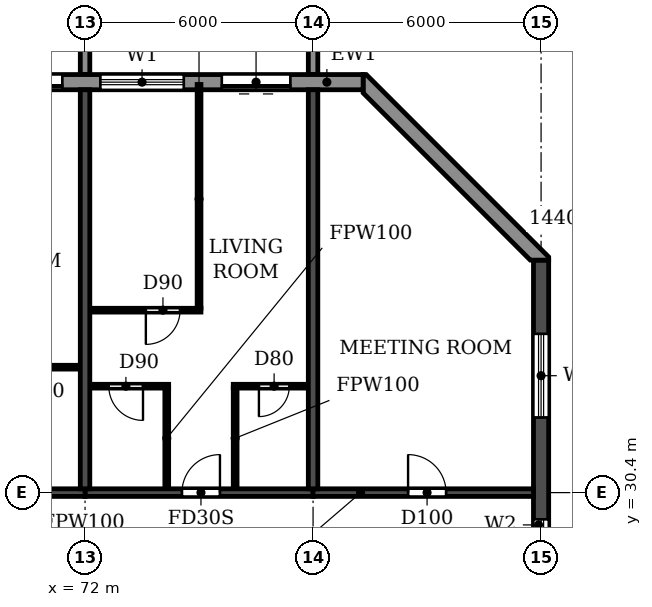
"""IFC4 building model, lengths in metres.
Left out: names, types, materials, properties, quantities, classifications, styles, units other than length and angle.
Written with IfcOpenShell. Run it as: python <this file> out.ifc"""

import sys

from ifc_helpers import new_model, si_unit, direction, frame, frame_2d, origin, place, context, subcontext, project, spatial, polyline, rectangle, outline, extrude, source, transform, mapped, element, fill, save


model = new_model("IFC4")
c1 = context("Model", 3, precision=1e-05, world=origin(), true_north=direction((0.0, 1.0)))
c2 = subcontext(c1, "Body", "Model", "MODEL_VIEW")
j1 = project(units=[si_unit("LENGTHUNIT", "METRE"), si_unit("PLANEANGLEUNIT", "RADIAN")], contexts=[c1])
p1 = place(None, origin())
s1 = spatial("IfcSite", under=j1, at=p1, CompositionType="ELEMENT")
p2 = place(p1, origin())
s2 = spatial("IfcBuilding", under=s1, at=p2, CompositionType="ELEMENT")
p3 = place(p2, frame((0.0, 0.0, 231.3)))
s3 = spatial("IfcBuildingStorey", under=s2, at=p3, CompositionType="ELEMENT", Elevation=231.3)
for number, where, z_axis, x_axis in (
    (1, (72.0, 30.5, 0.0), (0.0, 0.0, 1.0), (0.0, 1.0, 0.0)),
    (2, (78.0, 30.5, 0.0), (0.0, 0.0, 1.0), (0.0, 1.0, 0.0)),
):
    element("IfcWall", number, at=place(p3, frame(where, z_axis=z_axis, x_axis=x_axis)), inside=s3, PredefinedType="SHEAR", context=c2, shape_type="SweptSolid", body=[
        extrude(rectangle(XDim=10.5, YDim=0.25, at=frame_2d((5.25, 0.0))), origin(), (0.0, 0.0, 1.0), 3.08),
    ])
p4 = place(p3, frame((84.0, 4.683, 0.0), z_axis=(0.0, 0.0, 1.0), x_axis=(0.0, 1.0, 0.0)))
e3 = element("IfcWall", 3, at=p4, inside=s3, PredefinedType="SHEAR", context=c2, shape_type="SweptSolid", body=[
    extrude(rectangle(XDim=31.834, YDim=0.4, at=frame_2d((15.917, 0.0))), origin(), (0.0, 0.0, 1.0), 3.08),
])
p5 = place(p4, frame((23.817, 0.0, 0.9)))
e4 = element("IfcOpeningElement", 4, at=p5, cuts=e3, PredefinedType="OPENING", context=c2, shape_type="SweptSolid", body=[
    extrude(rectangle(XDim=1.2, YDim=1.5, at=frame_2d((0.6, 0.75))), frame((0.0, 0.21, 0.0), z_axis=(0.0, -1.0, 0.0), x_axis=(1.0, 0.0, 0.0)), (0.0, 0.0, 1.0), 0.42),
])
p6 = place(p4, frame((8.017, 0.0, 0.9)))
e5 = element("IfcOpeningElement", 5, at=p6, cuts=e3, PredefinedType="OPENING", context=c2, shape_type="SweptSolid", body=[
    extrude(rectangle(XDim=1.2, YDim=1.5, at=frame_2d((0.6, 0.75))), frame((0.0, 0.21, 0.0), z_axis=(0.0, -1.0, 0.0), x_axis=(1.0, 0.0, 0.0)), (0.0, 0.0, 1.0), 0.42),
])
p7 = place(p4, frame((27.694, 0.0, 0.6)))
e6 = element("IfcOpeningElement", 6, at=p7, cuts=e3, PredefinedType="OPENING", context=c2, shape_type="SweptSolid", body=[
    extrude(rectangle(XDim=2.2, YDim=1.8, at=frame_2d((1.1, 0.9))), frame((0.0, 0.21, 0.0), z_axis=(0.0, -1.0, 0.0), x_axis=(1.0, 0.0, 0.0)), (0.0, 0.0, 1.0), 0.42),
])
p8 = place(p4, frame((2.541, 0.0, 0.6)))
e7 = element("IfcOpeningElement", 7, at=p8, cuts=e3, PredefinedType="OPENING", context=c2, shape_type="SweptSolid", body=[
    extrude(rectangle(XDim=2.2, YDim=1.8, at=frame_2d((1.1, 0.9))), frame((0.0, 0.21, 0.0), z_axis=(0.0, -1.0, 0.0), x_axis=(1.0, 0.0, 0.0)), (0.0, 0.0, 1.0), 0.42),
])
p9 = place(p4, frame((15.917, 0.0, 0.9)))
e8 = element("IfcOpeningElement", 8, at=p9, cuts=e3, PredefinedType="OPENING", context=c2, shape_type="SweptSolid", body=[
    extrude(rectangle(XDim=1.2, YDim=1.5, at=frame_2d((0.6, 0.75))), frame((0.0, 0.21, 0.0), z_axis=(0.0, -1.0, 0.0), x_axis=(1.0, 0.0, 0.0)), (0.0, 0.0, 1.0), 0.42),
])
p10 = place(p3, frame((66.0, 30.4, 0.0), z_axis=(0.0, 0.0, 1.0), x_axis=(1.0, 0.0, 0.0)))
e9 = element("IfcWall", 9, at=p10, inside=s3, PredefinedType="SHEAR", context=c2, shape_type="SweptSolid", body=[
    extrude(rectangle(XDim=6.0, YDim=0.2, at=frame_2d((3.0, 0.0))), origin(), (0.0, 0.0, 1.0), 2.48),
])
p11 = place(p10, frame((2.55, 0.0, 0.0)))
e10 = element("IfcOpeningElement", 10, at=p11, cuts=e9, PredefinedType="OPENING", context=c2, shape_type="SweptSolid", body=[
    extrude(rectangle(XDim=1.0, YDim=2.1, at=frame_2d((0.5, 1.05))), frame((0.0, 0.11, 0.0), z_axis=(0.0, -1.0, 0.0), x_axis=(1.0, 0.0, 0.0)), (0.0, 0.0, 1.0), 0.22),
])
p12 = place(p3, frame((72.0, 30.4, 0.0), z_axis=(0.0, 0.0, 1.0), x_axis=(1.0, 0.0, 0.0)))
e11 = element("IfcWall", 11, at=p12, inside=s3, PredefinedType="SHEAR", context=c2, shape_type="SweptSolid", body=[
    extrude(rectangle(XDim=6.0, YDim=0.2, at=frame_2d((3.0, 0.0))), origin(), (0.0, 0.0, 1.0), 2.48),
])
p13 = place(p12, frame((2.55, 0.0, 0.0)))
e12 = element("IfcOpeningElement", 12, at=p13, cuts=e11, PredefinedType="OPENING", context=c2, shape_type="SweptSolid", body=[
    extrude(rectangle(XDim=1.0, YDim=2.1, at=frame_2d((0.5, 1.05))), frame((0.0, 0.11, 0.0), z_axis=(0.0, -1.0, 0.0), x_axis=(1.0, 0.0, 0.0)), (0.0, 0.0, 1.0), 0.22),
])
p14 = place(p3, frame((78.0, 30.4, 0.0), z_axis=(0.0, 0.0, 1.0), x_axis=(1.0, 0.0, 0.0)))
e13 = element("IfcWall", 13, at=p14, inside=s3, PredefinedType="SHEAR", context=c2, shape_type="SweptSolid", body=[
    extrude(rectangle(XDim=5.8, YDim=0.2, at=frame_2d((2.9, 0.0))), origin(), (0.0, 0.0, 1.0), 2.48),
])
p15 = place(p14, frame((2.5, 0.0, 0.0)))
e14 = element("IfcOpeningElement", 14, at=p15, cuts=e13, PredefinedType="OPENING", context=c2, shape_type="SweptSolid", body=[
    extrude(rectangle(XDim=1.0, YDim=2.1, at=frame_2d((0.5, 1.05))), frame((0.0, 0.11, 0.0), z_axis=(0.0, -1.0, 0.0), x_axis=(1.0, 0.0, 0.0)), (0.0, 0.0, 1.0), 0.22),
])
p16 = place(p3, origin())
e15 = element("IfcWall", 15, at=p16, inside=s3, PredefinedType="STANDARD", context=c2, shape_type="SweptSolid", body=[
    extrude(outline(polyline([(84.2, 36.517), (84.2, 36.6), (79.4, 41.4), (79.317, 41.4), (79.317, 40.917), (83.717, 36.517), (84.2, 36.517)])), origin(), (0.0, 0.0, 1.0), 3.08),
])
p17 = place(p3, frame((79.317, 41.2, 0.0), z_axis=(0.0, 0.0, 1.0), x_axis=(-1.0, 0.0, 0.0)))
e16 = element("IfcWall", 16, at=p17, inside=s3, PredefinedType="STANDARD", context=c2, shape_type="SweptSolid", body=[
    extrude(rectangle(XDim=56.634, YDim=0.4, at=frame_2d((28.317, 0.0))), origin(), (0.0, 0.0, 1.0), 3.08),
])
p18 = place(p17, frame((52.917, 0.0, 0.0)))
e17 = element("IfcOpeningElement", 17, at=p18, cuts=e16, PredefinedType="OPENING", context=c2, shape_type="SweptSolid", body=[
    extrude(rectangle(XDim=1.8, YDim=2.4, at=frame_2d((0.9, 1.2))), frame((0.0, 0.21, 0.0), z_axis=(0.0, -1.0, 0.0), x_axis=(1.0, 0.0, 0.0)), (0.0, 0.0, 1.0), 0.42),
])
p19 = place(p17, frame((49.717, 0.0, 0.9)))
e18 = element("IfcOpeningElement", 18, at=p19, cuts=e16, PredefinedType="OPENING", context=c2, shape_type="SweptSolid", body=[
    extrude(rectangle(XDim=2.2, YDim=1.5, at=frame_2d((1.1, 0.75))), frame((0.0, 0.21, 0.0), z_axis=(0.0, -1.0, 0.0), x_axis=(1.0, 0.0, 0.0)), (0.0, 0.0, 1.0), 0.42),
])
p20 = place(p17, frame((46.717, 0.0, 0.9)))
e19 = element("IfcOpeningElement", 19, at=p20, cuts=e16, PredefinedType="OPENING", context=c2, shape_type="SweptSolid", body=[
    extrude(rectangle(XDim=2.2, YDim=1.5, at=frame_2d((1.1, 0.75))), frame((0.0, 0.21, 0.0), z_axis=(0.0, -1.0, 0.0), x_axis=(1.0, 0.0, 0.0)), (0.0, 0.0, 1.0), 0.42),
])
p21 = place(p17, frame((43.717, 0.0, 0.9)))
e20 = element("IfcOpeningElement", 20, at=p21, cuts=e16, PredefinedType="OPENING", context=c2, shape_type="SweptSolid", body=[
    extrude(rectangle(XDim=2.2, YDim=1.5, at=frame_2d((1.1, 0.75))), frame((0.0, 0.21, 0.0), z_axis=(0.0, -1.0, 0.0), x_axis=(1.0, 0.0, 0.0)), (0.0, 0.0, 1.0), 0.42),
])
p22 = place(p17, frame((40.717, 0.0, 0.9)))
e21 = element("IfcOpeningElement", 21, at=p22, cuts=e16, PredefinedType="OPENING", context=c2, shape_type="SweptSolid", body=[
    extrude(rectangle(XDim=2.2, YDim=1.5, at=frame_2d((1.1, 0.75))), frame((0.0, 0.21, 0.0), z_axis=(0.0, -1.0, 0.0), x_axis=(1.0, 0.0, 0.0)), (0.0, 0.0, 1.0), 0.42),
])
p23 = place(p17, frame((37.917, 0.0, 0.0)))
e22 = element("IfcOpeningElement", 22, at=p23, cuts=e16, PredefinedType="OPENING", context=c2, shape_type="SweptSolid", body=[
    extrude(rectangle(XDim=1.8, YDim=2.4, at=frame_2d((0.9, 1.2))), frame((0.0, 0.21, 0.0), z_axis=(0.0, -1.0, 0.0), x_axis=(1.0, 0.0, 0.0)), (0.0, 0.0, 1.0), 0.42),
])
p24 = place(p17, frame((34.717, 0.0, 0.9)))
e23 = element("IfcOpeningElement", 23, at=p24, cuts=e16, PredefinedType="OPENING", context=c2, shape_type="SweptSolid", body=[
    extrude(rectangle(XDim=2.2, YDim=1.5, at=frame_2d((1.1, 0.75))), frame((0.0, 0.21, 0.0), z_axis=(0.0, -1.0, 0.0), x_axis=(1.0, 0.0, 0.0)), (0.0, 0.0, 1.0), 0.42),
])
p25 = place(p17, frame((31.917, 0.0, 0.0)))
e24 = element("IfcOpeningElement", 24, at=p25, cuts=e16, PredefinedType="OPENING", context=c2, shape_type="SweptSolid", body=[
    extrude(rectangle(XDim=1.8, YDim=2.4, at=frame_2d((0.9, 1.2))), frame((0.0, 0.21, 0.0), z_axis=(0.0, -1.0, 0.0), x_axis=(1.0, 0.0, 0.0)), (0.0, 0.0, 1.0), 0.42),
])
p26 = place(p17, frame((28.717, 0.0, 0.9)))
e25 = element("IfcOpeningElement", 25, at=p26, cuts=e16, PredefinedType="OPENING", context=c2, shape_type="SweptSolid", body=[
    extrude(rectangle(XDim=2.2, YDim=1.5, at=frame_2d((1.1, 0.75))), frame((0.0, 0.21, 0.0), z_axis=(0.0, -1.0, 0.0), x_axis=(1.0, 0.0, 0.0)), (0.0, 0.0, 1.0), 0.42),
])
p27 = place(p17, frame((25.917, 0.0, 0.0)))
e26 = element("IfcOpeningElement", 26, at=p27, cuts=e16, PredefinedType="OPENING", context=c2, shape_type="SweptSolid", body=[
    extrude(rectangle(XDim=1.8, YDim=2.4, at=frame_2d((0.9, 1.2))), frame((0.0, 0.21, 0.0), z_axis=(0.0, -1.0, 0.0), x_axis=(1.0, 0.0, 0.0)), (0.0, 0.0, 1.0), 0.42),
])
p28 = place(p17, frame((22.717, 0.0, 0.9)))
e27 = element("IfcOpeningElement", 27, at=p28, cuts=e16, PredefinedType="OPENING", context=c2, shape_type="SweptSolid", body=[
    extrude(rectangle(XDim=2.2, YDim=1.5, at=frame_2d((1.1, 0.75))), frame((0.0, 0.21, 0.0), z_axis=(0.0, -1.0, 0.0), x_axis=(1.0, 0.0, 0.0)), (0.0, 0.0, 1.0), 0.42),
])
p29 = place(p17, frame((19.717, 0.0, 0.9)))
e28 = element("IfcOpeningElement", 28, at=p29, cuts=e16, PredefinedType="OPENING", context=c2, shape_type="SweptSolid", body=[
    extrude(rectangle(XDim=2.2, YDim=1.5, at=frame_2d((1.1, 0.75))), frame((0.0, 0.21, 0.0), z_axis=(0.0, -1.0, 0.0), x_axis=(1.0, 0.0, 0.0)), (0.0, 0.0, 1.0), 0.42),
])
p30 = place(p17, frame((16.717, 0.0, 0.9)))
e29 = element("IfcOpeningElement", 29, at=p30, cuts=e16, PredefinedType="OPENING", context=c2, shape_type="SweptSolid", body=[
    extrude(rectangle(XDim=2.2, YDim=1.5, at=frame_2d((1.1, 0.75))), frame((0.0, 0.21, 0.0), z_axis=(0.0, -1.0, 0.0), x_axis=(1.0, 0.0, 0.0)), (0.0, 0.0, 1.0), 0.42),
])
p31 = place(p17, frame((13.917, 0.0, 0.0)))
e30 = element("IfcOpeningElement", 30, at=p31, cuts=e16, PredefinedType="OPENING", context=c2, shape_type="SweptSolid", body=[
    extrude(rectangle(XDim=1.8, YDim=2.4, at=frame_2d((0.9, 1.2))), frame((0.0, 0.21, 0.0), z_axis=(0.0, -1.0, 0.0), x_axis=(1.0, 0.0, 0.0)), (0.0, 0.0, 1.0), 0.42),
])
p32 = place(p17, frame((10.717, 0.0, 0.9)))
e31 = element("IfcOpeningElement", 31, at=p32, cuts=e16, PredefinedType="OPENING", context=c2, shape_type="SweptSolid", body=[
    extrude(rectangle(XDim=2.2, YDim=1.5, at=frame_2d((1.1, 0.75))), frame((0.0, 0.21, 0.0), z_axis=(0.0, -1.0, 0.0), x_axis=(1.0, 0.0, 0.0)), (0.0, 0.0, 1.0), 0.42),
])
p33 = place(p17, frame((7.917, 0.0, 0.0)))
e32 = element("IfcOpeningElement", 32, at=p33, cuts=e16, PredefinedType="OPENING", context=c2, shape_type="SweptSolid", body=[
    extrude(rectangle(XDim=1.8, YDim=2.4, at=frame_2d((0.9, 1.2))), frame((0.0, 0.21, 0.0), z_axis=(0.0, -1.0, 0.0), x_axis=(1.0, 0.0, 0.0)), (0.0, 0.0, 1.0), 0.42),
])
p34 = place(p17, frame((4.717, 0.0, 0.9)))
e33 = element("IfcOpeningElement", 33, at=p34, cuts=e16, PredefinedType="OPENING", context=c2, shape_type="SweptSolid", body=[
    extrude(rectangle(XDim=2.2, YDim=1.5, at=frame_2d((1.1, 0.75))), frame((0.0, 0.21, 0.0), z_axis=(0.0, -1.0, 0.0), x_axis=(1.0, 0.0, 0.0)), (0.0, 0.0, 1.0), 0.42),
])
p35 = place(p17, frame((1.917, 0.0, 0.0)))
e34 = element("IfcOpeningElement", 34, at=p35, cuts=e16, PredefinedType="OPENING", context=c2, shape_type="SweptSolid", body=[
    extrude(rectangle(XDim=1.8, YDim=2.4, at=frame_2d((0.9, 1.2))), frame((0.0, 0.21, 0.0), z_axis=(0.0, -1.0, 0.0), x_axis=(1.0, 0.0, 0.0)), (0.0, 0.0, 1.0), 0.42),
])
m1 = source(origin(), c2, "Body", "SweptSolid", [
    extrude(outline(polyline([(0.0, 0.0), (0.25, 0.0), (0.25, 3.1), (0.0, 3.1), (0.0, 0.0)])), origin(), (0.0, 0.0, 1.0), 3.1),
])
for number, where in (
    (35, (71.875, 41.4, 0.0)),
    (36, (77.875, 41.4, 0.0)),
):
    element("IfcWall", number, at=place(p3, frame(where)), inside=s3, PredefinedType="STANDARD", context=c2, shape_type="MappedRepresentation", body=[
        mapped(m1, transform((0.0, 0.0, 0.0))),
    ])
p36 = place(p3, frame((72.135, 33.2, 0.0), z_axis=(0.0, 0.0, 1.0), x_axis=(1.0, 0.0, 0.0)))
e37 = element("IfcWall", 37, at=p36, inside=s3, PredefinedType="PARTITIONING", context=c2, shape_type="SweptSolid", body=[
    extrude(rectangle(XDim=2.065, YDim=0.1, at=frame_2d((1.032, 0.0))), origin(), (0.0, 0.0, 1.0), 3.08),
])
p37 = place(p36, frame((0.49, 0.0, 0.0)))
e38 = element("IfcOpeningElement", 38, at=p37, cuts=e37, PredefinedType="OPENING", context=c2, shape_type="SweptSolid", body=[
    extrude(rectangle(XDim=0.9, YDim=2.1, at=frame_2d((0.45, 1.05))), frame((0.0, 0.06, 0.0), z_axis=(0.0, -1.0, 0.0), x_axis=(1.0, 0.0, 0.0)), (0.0, 0.0, 1.0), 0.12),
])
p38 = place(p3, frame((75.9, 33.2, 0.0), z_axis=(0.0, 0.0, 1.0), x_axis=(1.0, 0.0, 0.0)))
e39 = element("IfcWall", 39, at=p38, inside=s3, PredefinedType="PARTITIONING", context=c2, shape_type="SweptSolid", body=[
    extrude(rectangle(XDim=1.965, YDim=0.1, at=frame_2d((0.982, 0.0))), origin(), (0.0, 0.0, 1.0), 3.08),
])
p39 = place(p38, frame((0.675, 0.0, 0.0)))
e40 = element("IfcOpeningElement", 40, at=p39, cuts=e39, PredefinedType="OPENING", context=c2, shape_type="SweptSolid", body=[
    extrude(rectangle(XDim=0.8, YDim=2.1, at=frame_2d((0.4, 1.05))), frame((0.0, 0.06, 0.0), z_axis=(0.0, -1.0, 0.0), x_axis=(1.0, 0.0, 0.0)), (0.0, 0.0, 1.0), 0.12),
])
p40 = place(p3, frame((69.9, 33.7, 0.0), z_axis=(0.0, 0.0, 1.0), x_axis=(1.0, 0.0, 0.0)))
e41 = element("IfcWall", 41, at=p40, inside=s3, PredefinedType="PARTITIONING", context=c2, shape_type="SweptSolid", body=[
    extrude(rectangle(XDim=1.965, YDim=0.1, at=frame_2d((0.982, 0.0))), origin(), (0.0, 0.0, 1.0), 3.08),
])
p41 = place(p3, frame((72.135, 35.2, 0.0), z_axis=(0.0, 0.0, 1.0), x_axis=(1.0, 0.0, 0.0)))
e42 = element("IfcWall", 42, at=p41, inside=s3, PredefinedType="PARTITIONING", context=c2, shape_type="SweptSolid", body=[
    extrude(rectangle(XDim=2.915, YDim=0.1, at=frame_2d((1.458, 0.0))), origin(), (0.0, 0.0, 1.0), 3.08),
])
p42 = place(p41, frame((1.465, 0.0, 0.0)))
e43 = element("IfcOpeningElement", 43, at=p42, cuts=e42, PredefinedType="OPENING", context=c2, shape_type="SweptSolid", body=[
    extrude(rectangle(XDim=0.9, YDim=2.1, at=frame_2d((0.45, 1.05))), frame((0.0, 0.06, 0.0), z_axis=(0.0, -1.0, 0.0), x_axis=(1.0, 0.0, 0.0)), (0.0, 0.0, 1.0), 0.12),
])
p43 = place(p3, frame((74.15, 30.51, 0.0), z_axis=(0.0, 0.0, 1.0), x_axis=(0.0, 1.0, 0.0)))
e44 = element("IfcWall", 44, at=p43, inside=s3, PredefinedType="PARTITIONING", context=c2, shape_type="SweptSolid", body=[
    extrude(rectangle(XDim=2.64, YDim=0.1, at=frame_2d((1.32, 0.0))), origin(), (0.0, 0.0, 1.0), 3.08),
])
p44 = place(p3, frame((75.0, 35.25, 0.0), z_axis=(0.0, 0.0, 1.0), x_axis=(0.0, 1.0, 0.0)))
e45 = element("IfcWall", 45, at=p44, inside=s3, PredefinedType="PARTITIONING", context=c2, shape_type="SweptSolid", body=[
    extrude(rectangle(XDim=5.89, YDim=0.1, at=frame_2d((2.945, 0.0))), origin(), (0.0, 0.0, 1.0), 3.08),
])
p45 = place(p3, frame((75.95, 30.51, 0.0), z_axis=(0.0, 0.0, 1.0), x_axis=(0.0, 1.0, 0.0)))
e46 = element("IfcWall", 46, at=p45, inside=s3, PredefinedType="PARTITIONING", context=c2, shape_type="SweptSolid", body=[
    extrude(rectangle(XDim=2.64, YDim=0.1, at=frame_2d((1.32, 0.0))), origin(), (0.0, 0.0, 1.0), 3.08),
])
p46 = place(p5, origin())
e47 = element("IfcWindow", 47, at=p46, inside=s3, PartitioningType="SINGLE_PANEL", PredefinedType="WINDOW", context=c2, shape_type="SweptSolid", body=[
    extrude(rectangle(XDim=1.2, YDim=1.5, at=frame_2d((0.6, 0.75))), frame((0.0, 0.03, 0.0), z_axis=(0.0, -1.0, 0.0), x_axis=(1.0, 0.0, 0.0)), (0.0, 0.0, 1.0), 0.06),
])
fill(e4, e47)
p47 = place(p7, origin())
e48 = element("IfcWindow", 48, at=p47, inside=s3, PartitioningType="DOUBLE_PANEL_HORIZONTAL", PredefinedType="WINDOW", context=c2, shape_type="SweptSolid", body=[
    extrude(rectangle(XDim=2.2, YDim=1.8, at=frame_2d((1.1, 0.9))), frame((0.0, 0.03, 0.0), z_axis=(0.0, -1.0, 0.0), x_axis=(1.0, 0.0, 0.0)), (0.0, 0.0, 1.0), 0.06),
])
fill(e6, e48)
p48 = place(p33, origin())
e49 = element("IfcDoor", 49, at=p48, inside=s3, OperationType="DOUBLE_DOOR_SLIDING", PredefinedType="DOOR", context=c2, shape_type="SweptSolid", body=[
    extrude(rectangle(XDim=1.8, YDim=2.4, at=frame_2d((0.9, 1.2))), frame((0.0, 0.025, 0.0), z_axis=(0.0, -1.0, 0.0), x_axis=(1.0, 0.0, 0.0)), (0.0, 0.0, 1.0), 0.05),
])
fill(e32, e49)
p49 = place(p34, origin())
e50 = element("IfcWindow", 50, at=p49, inside=s3, PartitioningType="DOUBLE_PANEL_HORIZONTAL", PredefinedType="WINDOW", context=c2, shape_type="SweptSolid", body=[
    extrude(rectangle(XDim=2.2, YDim=1.5, at=frame_2d((1.1, 0.75))), frame((0.0, 0.03, 0.0), z_axis=(0.0, -1.0, 0.0), x_axis=(1.0, 0.0, 0.0)), (0.0, 0.0, 1.0), 0.06),
])
fill(e33, e50)
p50 = place(p35, origin())
e51 = element("IfcDoor", 51, at=p50, inside=s3, OperationType="DOUBLE_DOOR_SLIDING", PredefinedType="DOOR", context=c2, shape_type="SweptSolid", body=[
    extrude(rectangle(XDim=1.8, YDim=2.4, at=frame_2d((0.9, 1.2))), frame((0.0, 0.025, 0.0), z_axis=(0.0, -1.0, 0.0), x_axis=(1.0, 0.0, 0.0)), (0.0, 0.0, 1.0), 0.05),
])
fill(e34, e51)
p51 = place(p37, frame((0.9, 0.0, 0.0), z_axis=(0.0, 0.0, 1.0), x_axis=(-1.0, 0.0, 0.0)))
e52 = element("IfcDoor", 52, at=p51, inside=s3, OperationType="SINGLE_SWING_LEFT", PredefinedType="DOOR", context=c2, shape_type="SweptSolid", body=[
    extrude(rectangle(XDim=0.9, YDim=2.1, at=frame_2d((0.45, 1.05))), frame((0.0, 0.025, 0.0), z_axis=(0.0, -1.0, 0.0), x_axis=(1.0, 0.0, 0.0)), (0.0, 0.0, 1.0), 0.05),
])
fill(e38, e52)
p52 = place(p42, frame((0.9, 0.0, 0.0), z_axis=(0.0, 0.0, 1.0), x_axis=(-1.0, 0.0, 0.0)))
e53 = element("IfcDoor", 53, at=p52, inside=s3, OperationType="SINGLE_SWING_RIGHT", PredefinedType="DOOR", context=c2, shape_type="SweptSolid", body=[
    extrude(rectangle(XDim=0.9, YDim=2.1, at=frame_2d((0.45, 1.05))), frame((0.0, 0.025, 0.0), z_axis=(0.0, -1.0, 0.0), x_axis=(1.0, 0.0, 0.0)), (0.0, 0.0, 1.0), 0.05),
])
fill(e43, e53)
p53 = place(p13, origin())
e54 = element("IfcDoor", 54, at=p53, inside=s3, OperationType="SINGLE_SWING_RIGHT", PredefinedType="DOOR", context=c2, shape_type="SweptSolid", body=[
    extrude(rectangle(XDim=1.0, YDim=2.1, at=frame_2d((0.5, 1.05))), frame((0.0, 0.025, 0.0), z_axis=(0.0, -1.0, 0.0), x_axis=(1.0, 0.0, 0.0)), (0.0, 0.0, 1.0), 0.05),
])
fill(e12, e54)
p54 = place(p39, frame((0.8, 0.0, 0.0), z_axis=(0.0, 0.0, 1.0), x_axis=(-1.0, 0.0, 0.0)))
e55 = element("IfcDoor", 55, at=p54, inside=s3, OperationType="SINGLE_SWING_RIGHT", PredefinedType="DOOR", context=c2, shape_type="SweptSolid", body=[
    extrude(rectangle(XDim=0.8, YDim=2.1, at=frame_2d((0.4, 1.05))), frame((0.0, 0.025, 0.0), z_axis=(0.0, -1.0, 0.0), x_axis=(1.0, 0.0, 0.0)), (0.0, 0.0, 1.0), 0.05),
])
fill(e40, e55)
p55 = place(p15, origin())
e56 = element("IfcDoor", 56, at=p55, inside=s3, OperationType="SINGLE_SWING_LEFT", PredefinedType="DOOR", context=c2, shape_type="SweptSolid", body=[
    extrude(rectangle(XDim=1.0, YDim=2.1, at=frame_2d((0.5, 1.05))), frame((0.0, 0.025, 0.0), z_axis=(0.0, -1.0, 0.0), x_axis=(1.0, 0.0, 0.0)), (0.0, 0.0, 1.0), 0.05),
])
fill(e14, e56)
save(model, sys.argv[1])
